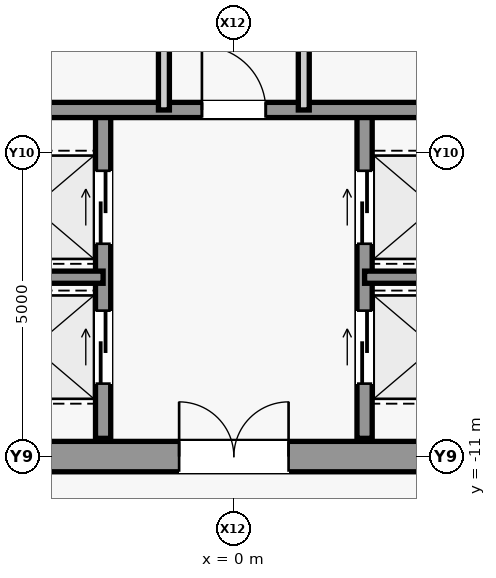
"""IFC4 building model, lengths in metres.
Left out: names, types, materials, properties, quantities, classifications, styles, units other than length and angle.
Written with IfcOpenShell. Run it as: python <this file> out.ifc"""

import sys

from ifc_helpers import new_model, si_unit, direction, frame, frame_2d, origin, place, context, subcontext, project, spatial, rectangle, extrude, source, transform, mapped, element, fill, save


model = new_model("IFC4")
c1 = context("Model", 3, precision=1e-05, world=origin(), true_north=direction((0.0, 1.0)))
c2 = subcontext(c1, "Body", "Model", "MODEL_VIEW")
j1 = project(units=[si_unit("LENGTHUNIT", "METRE"), si_unit("PLANEANGLEUNIT", "RADIAN")], contexts=[c1])
p1 = place(None, origin())
s1 = spatial("IfcSite", under=j1, at=p1, CompositionType="ELEMENT")
p2 = place(p1, origin())
s2 = spatial("IfcBuilding", under=s1, at=p2, CompositionType="ELEMENT")
p3 = place(p2, frame((0.0, 0.0, 144.7)))
s3 = spatial("IfcBuildingStorey", under=s2, at=p3, CompositionType="ELEMENT", Elevation=144.7)
m1 = source(origin(), c2, "Body", "SweptSolid", [
    extrude(rectangle(XDim=9.2, YDim=0.5, at=frame_2d((4.6, 0.0))), origin(), (0.0, 0.0, 1.0), 4.6),
])
p4 = place(p3, frame((-4.6, -11.0, 0.0), z_axis=(0.0, 0.0, 1.0), x_axis=(1.0, 0.0, 0.0)))
e1 = element("IfcWall", 1, at=p4, inside=s3, PredefinedType="SHEAR", context=c2, shape_type="MappedRepresentation", body=[
    mapped(m1, transform((0.0, 0.0, 0.0), scale=1.0)),
])
m2 = source(origin(), c2, "Body", "SweptSolid", [
    extrude(rectangle(XDim=1.8, YDim=2.25, at=frame_2d((0.9, 1.125))), frame((0.0, 0.26, 0.0), z_axis=(0.0, -1.0, 0.0), x_axis=(1.0, 0.0, 0.0)), (0.0, 0.0, 1.0), 0.52),
])
p5 = place(p4, frame((3.7, 0.0, 0.0)))
e2 = element("IfcOpeningElement", 2, at=p5, cuts=e1, PredefinedType="OPENING", context=c2, shape_type="MappedRepresentation", body=[
    mapped(m2, transform((0.0, 0.0, 0.0), scale=1.0)),
])
m3 = source(origin(), c2, "Body", "SweptSolid", [
    extrude(rectangle(XDim=5.4, YDim=0.25, at=frame_2d((2.7, 0.0))), origin(), (0.0, 0.0, 1.0), 4.6),
])
p6 = place(p3, frame((-2.15, -10.7, 0.0), z_axis=(0.0, 0.0, 1.0), x_axis=(0.0, 1.0, 0.0)))
e3 = element("IfcWall", 3, at=p6, inside=s3, PredefinedType="SHEAR", context=c2, shape_type="MappedRepresentation", body=[
    mapped(m3, transform((0.0, 0.0, 0.0), scale=1.0)),
])
m4 = source(origin(), c2, "Body", "SweptSolid", [
    extrude(rectangle(XDim=1.2, YDim=2.3, at=frame_2d((0.6, 1.15))), frame((0.0, 0.135, 0.0), z_axis=(0.0, -1.0, 0.0), x_axis=(1.0, 0.0, 0.0)), (0.0, 0.0, 1.0), 0.27),
])
p7 = place(p6, frame((0.9, 0.0, 0.0)))
e4 = element("IfcOpeningElement", 4, at=p7, cuts=e3, PredefinedType="OPENING", context=c2, shape_type="MappedRepresentation", body=[
    mapped(m4, transform((0.0, 0.0, 0.0), scale=1.0)),
])
p8 = place(p6, frame((3.2, 0.0, 0.0)))
e5 = element("IfcOpeningElement", 5, at=p8, cuts=e3, PredefinedType="OPENING", context=c2, shape_type="MappedRepresentation", body=[
    mapped(m4, transform((0.0, 0.0, 0.0), scale=1.0)),
])
p9 = place(p3, frame((2.15, -10.7, 0.0), z_axis=(0.0, 0.0, 1.0), x_axis=(0.0, 1.0, 0.0)))
e6 = element("IfcWall", 6, at=p9, inside=s3, PredefinedType="SHEAR", context=c2, shape_type="MappedRepresentation", body=[
    mapped(m3, transform((0.0, 0.0, 0.0), scale=1.0)),
])
p10 = place(p9, frame((0.9, 0.0, 0.0)))
e7 = element("IfcOpeningElement", 7, at=p10, cuts=e6, PredefinedType="OPENING", context=c2, shape_type="MappedRepresentation", body=[
    mapped(m4, transform((0.0, 0.0, 0.0), scale=1.0)),
])
p11 = place(p9, frame((3.2, 0.0, 0.0)))
e8 = element("IfcOpeningElement", 8, at=p11, cuts=e6, PredefinedType="OPENING", context=c2, shape_type="MappedRepresentation", body=[
    mapped(m4, transform((0.0, 0.0, 0.0), scale=1.0)),
])
m5 = source(origin(), c2, "Body", "SweptSolid", [
    extrude(rectangle(XDim=2.45, YDim=0.2, at=frame_2d((1.225, 0.0))), origin(), (0.0, 0.0, 1.0), 4.6),
])
for number, where, z_axis, x_axis in (
    (9, (-4.6, -8.05, 0.0), (0.0, 0.0, 1.0), (1.0, 0.0, 0.0)),
    (10, (2.15, -8.05, 0.0), (0.0, 0.0, 1.0), (1.0, 0.0, 0.0)),
):
    element("IfcWall", number, at=place(p3, frame(where, z_axis=z_axis, x_axis=x_axis)), inside=s3, PredefinedType="SHEAR", context=c2, shape_type="MappedRepresentation", body=[
        mapped(m5, transform((0.0, 0.0, 0.0), scale=1.0)),
    ])
m6 = source(origin(), c2, "Body", "SweptSolid", [
    extrude(rectangle(XDim=9.2, YDim=0.25, at=frame_2d((4.6, 0.0))), origin(), (0.0, 0.0, 1.0), 4.6),
])
p12 = place(p3, frame((-4.6, -5.3, 0.0), z_axis=(0.0, 0.0, 1.0), x_axis=(1.0, 0.0, 0.0)))
e11 = element("IfcWall", 11, at=p12, inside=s3, PredefinedType="SHEAR", context=c2, shape_type="MappedRepresentation", body=[
    mapped(m6, transform((0.0, 0.0, 0.0), scale=1.0)),
])
m7 = source(origin(), c2, "Body", "SweptSolid", [
    extrude(rectangle(XDim=1.05, YDim=2.2, at=frame_2d((0.525, 1.1))), frame((0.0, 0.135, 0.0), z_axis=(0.0, -1.0, 0.0), x_axis=(1.0, 0.0, 0.0)), (0.0, 0.0, 1.0), 0.27),
])
p13 = place(p12, frame((4.075, 0.0, 0.0)))
e12 = element("IfcOpeningElement", 12, at=p13, cuts=e11, PredefinedType="OPENING", context=c2, shape_type="MappedRepresentation", body=[
    mapped(m7, transform((0.0, 0.0, 0.0), scale=1.0)),
])
m8 = source(origin(), c2, "Body", "SweptSolid", [
    extrude(rectangle(XDim=10.6, YDim=0.18, at=frame_2d((5.3, 0.0))), origin(), (0.0, 0.0, 1.0), 4.6),
])
p14 = place(p3, frame((-1.15, -5.3, 0.0), z_axis=(0.0, 0.0, 1.0), x_axis=(0.0, 1.0, 0.0)))
e13 = element("IfcWall", 13, at=p14, inside=s3, PredefinedType="PARTITIONING", context=c2, shape_type="MappedRepresentation", body=[
    mapped(m8, transform((0.0, 0.0, 0.0), scale=1.0)),
])
m9 = source(origin(), c2, "Body", "SweptSolid", [
    extrude(rectangle(XDim=0.9, YDim=2.15, at=frame_2d((0.45, 1.075))), frame((0.0, 0.1, 0.0), z_axis=(0.0, -1.0, 0.0), x_axis=(1.0, 0.0, 0.0)), (0.0, 0.0, 1.0), 0.2),
])
p15 = place(p14, frame((1.3, 0.0, 0.0)))
e14 = element("IfcOpeningElement", 14, at=p15, cuts=e13, PredefinedType="OPENING", context=c2, shape_type="MappedRepresentation", body=[
    mapped(m9, transform((0.0, 0.0, 0.0), scale=1.0)),
])
p16 = place(p14, frame((4.9, 0.0, 0.0)))
e15 = element("IfcOpeningElement", 15, at=p16, cuts=e13, PredefinedType="OPENING", context=c2, shape_type="MappedRepresentation", body=[
    mapped(m9, transform((0.0, 0.0, 0.0), scale=1.0)),
])
p17 = place(p14, frame((7.8, 0.0, 0.0)))
e16 = element("IfcOpeningElement", 16, at=p17, cuts=e13, PredefinedType="OPENING", context=c2, shape_type="MappedRepresentation", body=[
    mapped(m9, transform((0.0, 0.0, 0.0), scale=1.0)),
])
p18 = place(p14, frame((9.475, 0.0, 0.0)))
e17 = element("IfcOpeningElement", 17, at=p18, cuts=e13, PredefinedType="OPENING", context=c2, shape_type="MappedRepresentation", body=[
    mapped(m9, transform((0.0, 0.0, 0.0), scale=1.0)),
])
p19 = place(p3, frame((1.15, -5.3, 0.0), z_axis=(0.0, 0.0, 1.0), x_axis=(0.0, 1.0, 0.0)))
e18 = element("IfcWall", 18, at=p19, inside=s3, PredefinedType="PARTITIONING", context=c2, shape_type="MappedRepresentation", body=[
    mapped(m8, transform((0.0, 0.0, 0.0), scale=1.0)),
])
p20 = place(p19, frame((4.2, 0.0, 0.0)))
e19 = element("IfcOpeningElement", 19, at=p20, cuts=e18, PredefinedType="OPENING", context=c2, shape_type="MappedRepresentation", body=[
    mapped(m9, transform((0.0, 0.0, 0.0), scale=1.0)),
])
p21 = place(p19, frame((9.475, 0.0, 0.0)))
e20 = element("IfcOpeningElement", 20, at=p21, cuts=e18, PredefinedType="OPENING", context=c2, shape_type="MappedRepresentation", body=[
    mapped(m9, transform((0.0, 0.0, 0.0), scale=1.0)),
])
m10 = source(origin(), c2, "Body", "SweptSolid", [
    extrude(rectangle(XDim=1.05, YDim=2.2, at=frame_2d((0.525, 1.1))), frame((0.0, 0.025, 0.0), z_axis=(0.0, -1.0, 0.0), x_axis=(1.0, 0.0, 0.0)), (0.0, 0.0, 1.0), 0.05),
])
p22 = place(p13, origin())
e21 = element("IfcDoor", 21, at=p22, inside=s3, OperationType="SINGLE_SWING_LEFT", PredefinedType="DOOR", context=c2, shape_type="MappedRepresentation", body=[
    mapped(m10, transform((0.0, 0.0, 0.0), scale=1.0)),
])
fill(e12, e21)
m11 = source(origin(), c2, "Body", "SweptSolid", [
    extrude(rectangle(XDim=1.8, YDim=2.25, at=frame_2d((0.9, 1.125))), frame((0.0, 0.025, 0.0), z_axis=(0.0, -1.0, 0.0), x_axis=(1.0, 0.0, 0.0)), (0.0, 0.0, 1.0), 0.05),
])
p23 = place(p5, origin())
e22 = element("IfcDoor", 22, at=p23, inside=s3, OperationType="SINGLE_SWING_LEFT", PredefinedType="DOOR", context=c2, shape_type="MappedRepresentation", body=[
    mapped(m11, transform((0.0, 0.0, 0.0), scale=1.0)),
])
fill(e2, e22)
m12 = source(origin(), c2, "Body", "SweptSolid", [
    extrude(rectangle(XDim=1.2, YDim=2.3, at=frame_2d((0.6, 1.15))), frame((0.0, 0.025, 0.0), z_axis=(0.0, -1.0, 0.0), x_axis=(1.0, 0.0, 0.0)), (0.0, 0.0, 1.0), 0.05),
])
p24 = place(p7, origin())
e23 = element("IfcDoor", 23, at=p24, inside=s3, OperationType="SLIDING_TO_LEFT", PredefinedType="DOOR", context=c2, shape_type="MappedRepresentation", body=[
    mapped(m12, transform((0.0, 0.0, 0.0), scale=1.0)),
])
fill(e4, e23)
p25 = place(p10, origin())
e24 = element("IfcDoor", 24, at=p25, inside=s3, OperationType="SLIDING_TO_LEFT", PredefinedType="DOOR", context=c2, shape_type="MappedRepresentation", body=[
    mapped(m12, transform((0.0, 0.0, 0.0), scale=1.0)),
])
fill(e7, e24)
p26 = place(p8, origin())
e25 = element("IfcDoor", 25, at=p26, inside=s3, OperationType="SLIDING_TO_LEFT", PredefinedType="DOOR", context=c2, shape_type="MappedRepresentation", body=[
    mapped(m12, transform((0.0, 0.0, 0.0), scale=1.0)),
])
fill(e5, e25)
p27 = place(p11, origin())
e26 = element("IfcDoor", 26, at=p27, inside=s3, OperationType="SLIDING_TO_LEFT", PredefinedType="DOOR", context=c2, shape_type="MappedRepresentation", body=[
    mapped(m12, transform((0.0, 0.0, 0.0), scale=1.0)),
])
fill(e8, e26)
save(model, sys.argv[1])
